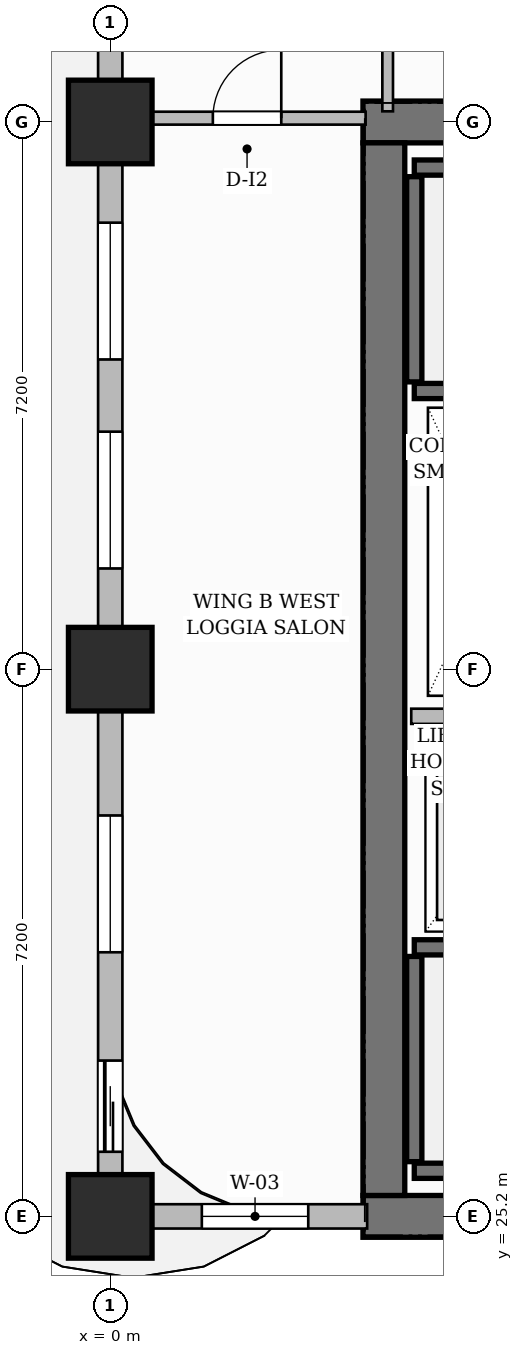
"""IFC4 building model, lengths in metres.
Left out: names, types, materials, properties, quantities, classifications, styles, units other than length and angle.
Written with IfcOpenShell. Run it as: python <this file> out.ifc"""

import sys

from ifc_helpers import new_model, si_unit, direction, frame, frame_2d, origin, origin_2d, place, context, subcontext, project, spatial, rectangle, extrude, source, transform, mapped, element, fill, save


model = new_model("IFC4")
c1 = context("Model", 3, precision=1e-05, world=origin(), true_north=direction((0.0, 1.0)))
c2 = subcontext(c1, "Body", "Model", "MODEL_VIEW")
j1 = project(units=[si_unit("LENGTHUNIT", "METRE"), si_unit("PLANEANGLEUNIT", "RADIAN")], contexts=[c1])
p1 = place(None, origin())
s1 = spatial("IfcSite", under=j1, at=p1, CompositionType="ELEMENT")
p2 = place(p1, origin())
s2 = spatial("IfcBuilding", under=s1, at=p2, CompositionType="ELEMENT")
p3 = place(p2, frame((0.0, 0.0, 84.2)))
s3 = spatial("IfcBuildingStorey", under=s2, at=p3, CompositionType="ELEMENT", Elevation=84.2)
for number, where, z_axis, x_axis in (
    (1, (3.325, 25.2, 0.0), (0.0, 0.0, 1.0), (1.0, 0.0, 0.0)),
    (2, (3.325, 39.6, 0.0), (0.0, 0.0, 1.0), (1.0, 0.0, 0.0)),
):
    element("IfcWall", number, at=place(p3, frame(where, z_axis=z_axis, x_axis=x_axis)), inside=s3, PredefinedType="SHEAR", context=c2, shape_type="SweptSolid", body=[
        extrude(rectangle(XDim=8.35, YDim=0.55, at=frame_2d((4.175, 0.0))), origin(), (0.0, 0.0, 1.0), 3.7),
    ])
p4 = place(p3, frame((3.6, 25.475, 0.0), z_axis=(0.0, 0.0, 1.0), x_axis=(0.0, 1.0, 0.0)))
e3 = element("IfcWall", 3, at=p4, inside=s3, PredefinedType="SHEAR", context=c2, shape_type="SweptSolid", body=[
    extrude(rectangle(XDim=13.85, YDim=0.55, at=frame_2d((6.925, 0.0))), origin(), (0.0, 0.0, 1.0), 3.7),
])
m1 = source(origin(), c2, "Body", "SweptSolid", [
    extrude(rectangle(XDim=1.1, YDim=1.1, at=origin_2d()), origin(), (0.0, 0.0, 1.0), 3.7),
])
for number, where, z_axis, x_axis in (
    (4, (0.0, 25.2, 0.0), (0.0, 0.0, 1.0), (1.0, 0.0, 0.0)),
    (5, (0.0, 32.4, 0.0), (0.0, 0.0, 1.0), (1.0, 0.0, 0.0)),
    (6, (0.0, 39.6, 0.0), (0.0, 0.0, 1.0), (1.0, 0.0, 0.0)),
):
    element("IfcColumn", number, at=place(p3, frame(where, z_axis=z_axis, x_axis=x_axis)), inside=s3, PredefinedType="COLUMN", context=c2, shape_type="MappedRepresentation", body=[
        mapped(m1, transform((0.0, 0.0, 0.0), scale=1.0)),
    ])
p5 = place(p3, frame((4.0, 25.8, 0.0), z_axis=(0.0, 0.0, 1.0), x_axis=(1.0, 0.0, 0.0)))
e7 = element("IfcWall", 7, at=p5, inside=s3, PredefinedType="SHEAR", context=c2, shape_type="SweptSolid", body=[
    extrude(rectangle(XDim=7.1, YDim=0.2, at=frame_2d((3.55, 0.0))), origin(), (0.0, 0.0, 1.0), 3.7),
])
p6 = place(p3, frame((4.0, 25.92, 0.0), z_axis=(0.0, 0.0, 1.0), x_axis=(0.0, 1.0, 0.0)))
e8 = element("IfcWall", 8, at=p6, inside=s3, PredefinedType="SHEAR", context=c2, shape_type="SweptSolid", body=[
    extrude(rectangle(XDim=2.7, YDim=0.2, at=frame_2d((1.35, 0.0))), origin(), (0.0, 0.0, 1.0), 3.7),
])
p7 = place(p3, frame((4.0, 28.74, 0.0), z_axis=(0.0, 0.0, 1.0), x_axis=(1.0, 0.0, 0.0)))
e9 = element("IfcWall", 9, at=p7, inside=s3, PredefinedType="SHEAR", context=c2, shape_type="SweptSolid", body=[
    extrude(rectangle(XDim=7.1, YDim=0.2, at=frame_2d((3.55, 0.0))), origin(), (0.0, 0.0, 1.0), 3.7),
])
p8 = place(p7, frame((5.815, 0.0, 0.0)))
e10 = element("IfcOpeningElement", 10, at=p8, cuts=e9, PredefinedType="OPENING", context=c2, shape_type="SweptSolid", body=[
    extrude(rectangle(XDim=1.05, YDim=2.2, at=frame_2d((0.525, 1.1))), frame((0.0, 0.11, 0.0), z_axis=(0.0, -1.0, 0.0), x_axis=(1.0, 0.0, 0.0)), (0.0, 0.0, 1.0), 0.22),
])
p9 = place(p3, frame((4.0, 39.0, 0.0), z_axis=(0.0, 0.0, 1.0), x_axis=(1.0, 0.0, 0.0)))
e11 = element("IfcWall", 11, at=p9, inside=s3, PredefinedType="SHEAR", context=c2, shape_type="SweptSolid", body=[
    extrude(rectangle(XDim=7.1, YDim=0.2, at=frame_2d((3.55, 0.0))), origin(), (0.0, 0.0, 1.0), 3.7),
])
p10 = place(p3, frame((4.0, 36.18, 0.0), z_axis=(0.0, 0.0, 1.0), x_axis=(0.0, 1.0, 0.0)))
e12 = element("IfcWall", 12, at=p10, inside=s3, PredefinedType="SHEAR", context=c2, shape_type="SweptSolid", body=[
    extrude(rectangle(XDim=2.7, YDim=0.2, at=frame_2d((1.35, 0.0))), origin(), (0.0, 0.0, 1.0), 3.7),
])
p11 = place(p3, frame((4.0, 36.06, 0.0), z_axis=(0.0, 0.0, 1.0), x_axis=(1.0, 0.0, 0.0)))
e13 = element("IfcWall", 13, at=p11, inside=s3, PredefinedType="SHEAR", context=c2, shape_type="SweptSolid", body=[
    extrude(rectangle(XDim=7.1, YDim=0.2, at=frame_2d((3.55, 0.0))), origin(), (0.0, 0.0, 1.0), 3.7),
])
p12 = place(p11, frame((5.815, 0.0, 0.0)))
e14 = element("IfcOpeningElement", 14, at=p12, cuts=e13, PredefinedType="OPENING", context=c2, shape_type="SweptSolid", body=[
    extrude(rectangle(XDim=1.05, YDim=2.2, at=frame_2d((0.525, 1.1))), frame((0.0, 0.11, 0.0), z_axis=(0.0, -1.0, 0.0), x_axis=(1.0, 0.0, 0.0)), (0.0, 0.0, 1.0), 0.22),
])
p13 = place(p3, frame((3.96, 31.78, 0.0), z_axis=(0.0, 0.0, 1.0), x_axis=(1.0, 0.0, 0.0)))
e15 = element("IfcWall", 15, at=p13, inside=s3, PredefinedType="PARTITIONING", context=c2, shape_type="SweptSolid", body=[
    extrude(rectangle(XDim=2.13, YDim=0.2, at=frame_2d((1.065, 0.0))), origin(), (0.0, 0.0, 1.0), 3.45),
])
p14 = place(p3, frame((0.24, 39.65, 0.0), z_axis=(0.0, 0.0, 1.0), x_axis=(1.0, 0.0, 0.0)))
e16 = element("IfcWall", 16, at=p14, inside=s3, PredefinedType="PARTITIONING", context=c2, shape_type="SweptSolid", body=[
    extrude(rectangle(XDim=3.12, YDim=0.17, at=frame_2d((1.56, 0.0))), origin(), (0.0, 0.0, 1.0), 3.45),
])
p15 = place(p14, frame((1.11, 0.0, 0.0)))
e17 = element("IfcOpeningElement", 17, at=p15, cuts=e16, PredefinedType="OPENING", context=c2, shape_type="SweptSolid", body=[
    extrude(rectangle(XDim=0.9, YDim=2.15, at=frame_2d((0.45, 1.075))), frame((0.0, 0.095, 0.0), z_axis=(0.0, -1.0, 0.0), x_axis=(1.0, 0.0, 0.0)), (0.0, 0.0, 1.0), 0.19),
])
p16 = place(p3, frame((3.65, 39.74, 0.0), z_axis=(0.0, 0.0, 1.0), x_axis=(0.0, 1.0, 0.0)))
e18 = element("IfcWall", 18, at=p16, inside=s3, PredefinedType="PARTITIONING", context=c2, shape_type="SweptSolid", body=[
    extrude(rectangle(XDim=1.745, YDim=0.14, at=frame_2d((0.873, 0.0))), origin(), (0.0, 0.0, 1.0), 3.45),
])
p17 = place(p3, frame((0.0, 25.2, 0.0), z_axis=(0.0, 0.0, 1.0), x_axis=(1.0, 0.0, 0.0)))
e19 = element("IfcWall", 19, at=p17, inside=s3, PredefinedType="SOLIDWALL", context=c2, shape_type="SweptSolid", body=[
    extrude(rectangle(XDim=3.38, YDim=0.32, at=frame_2d((1.69, 0.0))), origin(), (0.0, 0.0, 1.0), 3.45),
])
p18 = place(p17, frame((1.205, 0.0, 0.8)))
e20 = element("IfcOpeningElement", 20, at=p18, cuts=e19, PredefinedType="OPENING", context=c2, shape_type="SweptSolid", body=[
    extrude(rectangle(XDim=1.4, YDim=1.85, at=frame_2d((0.7, 0.925))), frame((0.0, 0.17, 0.0), z_axis=(0.0, -1.0, 0.0), x_axis=(1.0, 0.0, 0.0)), (0.0, 0.0, 1.0), 0.34),
])
p19 = place(p3, frame((0.0, 25.25, 0.0), z_axis=(0.0, 0.0, 1.0), x_axis=(0.0, 1.0, 0.0)))
e21 = element("IfcWall", 21, at=p19, inside=s3, PredefinedType="SOLIDWALL", context=c2, shape_type="SweptSolid", body=[
    extrude(rectangle(XDim=21.5, YDim=0.32, at=frame_2d((10.75, 0.0))), origin(), (0.0, 0.0, 1.0), 2.885),
])
p20 = place(p19, frame((18.607, 0.0, 0.0)))
e22 = element("IfcOpeningElement", 22, at=p20, cuts=e21, PredefinedType="OPENING", context=c2, shape_type="SweptSolid", body=[
    extrude(rectangle(XDim=1.2, YDim=2.2, at=frame_2d((0.6, 1.1))), frame((0.0, 0.17, 0.0), z_axis=(0.0, -1.0, 0.0), x_axis=(1.0, 0.0, 0.0)), (0.0, 0.0, 1.0), 0.34),
])
p21 = place(p19, frame((0.8, 0.0, 0.0)))
e23 = element("IfcOpeningElement", 23, at=p21, cuts=e21, PredefinedType="OPENING", context=c2, shape_type="SweptSolid", body=[
    extrude(rectangle(XDim=1.2, YDim=2.2, at=frame_2d((0.6, 1.1))), frame((0.0, 0.17, 0.0), z_axis=(0.0, -1.0, 0.0), x_axis=(1.0, 0.0, 0.0)), (0.0, 0.0, 1.0), 0.34),
])
p22 = place(p19, frame((3.425, 0.0, 0.8)))
e24 = element("IfcOpeningElement", 24, at=p22, cuts=e21, PredefinedType="OPENING", context=c2, shape_type="SweptSolid", body=[
    extrude(rectangle(XDim=1.8, YDim=1.85, at=frame_2d((0.9, 0.925))), frame((0.0, 0.17, 0.0), z_axis=(0.0, -1.0, 0.0), x_axis=(1.0, 0.0, 0.0)), (0.0, 0.0, 1.0), 0.34),
])
p23 = place(p19, frame((8.475, 0.0, 0.8)))
e25 = element("IfcOpeningElement", 25, at=p23, cuts=e21, PredefinedType="OPENING", context=c2, shape_type="SweptSolid", body=[
    extrude(rectangle(XDim=1.8, YDim=1.85, at=frame_2d((0.9, 0.925))), frame((0.0, 0.17, 0.0), z_axis=(0.0, -1.0, 0.0), x_axis=(1.0, 0.0, 0.0)), (0.0, 0.0, 1.0), 0.34),
])
p24 = place(p19, frame((11.225, 0.0, 0.8)))
e26 = element("IfcOpeningElement", 26, at=p24, cuts=e21, PredefinedType="OPENING", context=c2, shape_type="SweptSolid", body=[
    extrude(rectangle(XDim=1.8, YDim=1.85, at=frame_2d((0.9, 0.925))), frame((0.0, 0.17, 0.0), z_axis=(0.0, -1.0, 0.0), x_axis=(1.0, 0.0, 0.0)), (0.0, 0.0, 1.0), 0.34),
])
p25 = place(p19, frame((15.621, 0.0, 0.8)))
e27 = element("IfcOpeningElement", 27, at=p25, cuts=e21, PredefinedType="OPENING", context=c2, shape_type="SweptSolid", body=[
    extrude(rectangle(XDim=1.8, YDim=1.85, at=frame_2d((0.9, 0.925))), frame((0.0, 0.17, 0.0), z_axis=(0.0, -1.0, 0.0), x_axis=(1.0, 0.0, 0.0)), (0.0, 0.0, 1.0), 0.34),
])
m2 = source(origin(), c2, "Body", "SweptSolid", [
    extrude(rectangle(XDim=0.9, YDim=2.15, at=frame_2d((0.45, 1.075))), frame((0.0, 0.025, 0.0), z_axis=(0.0, -1.0, 0.0), x_axis=(1.0, 0.0, 0.0)), (0.0, 0.0, 1.0), 0.05),
])
p26 = place(p15, origin())
e28 = element("IfcDoor", 28, at=p26, inside=s3, OperationType="SINGLE_SWING_RIGHT", PredefinedType="DOOR", context=c2, shape_type="MappedRepresentation", body=[
    mapped(m2, transform((0.0, 0.0, 0.0), scale=1.0)),
])
fill(e17, e28)
m3 = source(origin(), c2, "Body", "SweptSolid", [
    extrude(rectangle(XDim=1.2, YDim=2.2, at=frame_2d((0.6, 1.1))), frame((0.0, 0.025, 0.0), z_axis=(0.0, -1.0, 0.0), x_axis=(1.0, 0.0, 0.0)), (0.0, 0.0, 1.0), 0.05),
])
p27 = place(p21, origin())
e29 = element("IfcDoor", 29, at=p27, inside=s3, OperationType="SLIDING_TO_LEFT", PredefinedType="DOOR", context=c2, shape_type="MappedRepresentation", body=[
    mapped(m3, transform((0.0, 0.0, 0.0), scale=1.0)),
])
fill(e23, e29)
m4 = source(origin(), c2, "Body", "SweptSolid", [
    extrude(rectangle(XDim=1.4, YDim=1.85, at=frame_2d((0.7, 0.925))), frame((0.0, 0.03, 0.0), z_axis=(0.0, -1.0, 0.0), x_axis=(1.0, 0.0, 0.0)), (0.0, 0.0, 1.0), 0.06),
])
p28 = place(p18, origin())
e30 = element("IfcWindow", 30, at=p28, inside=s3, PartitioningType="SINGLE_PANEL", PredefinedType="WINDOW", context=c2, shape_type="MappedRepresentation", body=[
    mapped(m4, transform((0.0, 0.0, 0.0), scale=1.0)),
])
fill(e20, e30)
m5 = source(origin(), c2, "Body", "SweptSolid", [
    extrude(rectangle(XDim=1.8, YDim=1.85, at=frame_2d((0.9, 0.925))), frame((0.0, 0.03, 0.0), z_axis=(0.0, -1.0, 0.0), x_axis=(1.0, 0.0, 0.0)), (0.0, 0.0, 1.0), 0.06),
])
p29 = place(p22, origin())
e31 = element("IfcWindow", 31, at=p29, inside=s3, PartitioningType="DOUBLE_PANEL_VERTICAL", PredefinedType="WINDOW", context=c2, shape_type="MappedRepresentation", body=[
    mapped(m5, transform((0.0, 0.0, 0.0), scale=1.0)),
])
fill(e24, e31)
p30 = place(p23, origin())
e32 = element("IfcWindow", 32, at=p30, inside=s3, PartitioningType="DOUBLE_PANEL_VERTICAL", PredefinedType="WINDOW", context=c2, shape_type="MappedRepresentation", body=[
    mapped(m5, transform((0.0, 0.0, 0.0), scale=1.0)),
])
fill(e25, e32)
p31 = place(p24, origin())
e33 = element("IfcWindow", 33, at=p31, inside=s3, PartitioningType="DOUBLE_PANEL_VERTICAL", PredefinedType="WINDOW", context=c2, shape_type="MappedRepresentation", body=[
    mapped(m5, transform((0.0, 0.0, 0.0), scale=1.0)),
])
fill(e26, e33)
save(model, sys.argv[1])
